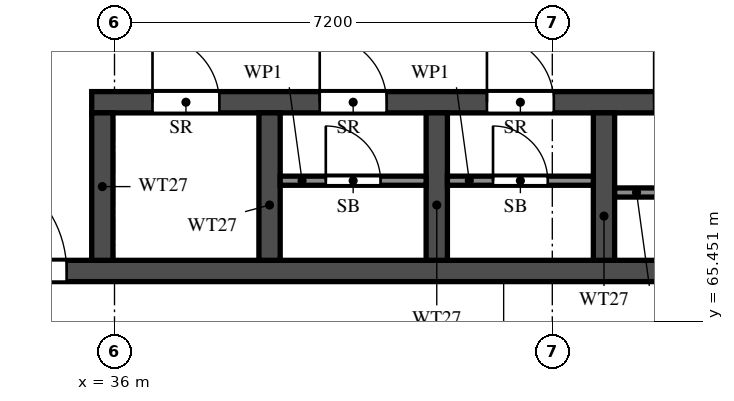
"""IFC4 building model, lengths in metres.
Left out: names, types, materials, properties, quantities, classifications, styles, units other than length and angle.
Written with IfcOpenShell. Run it as: python <this file> out.ifc"""

import sys

from ifc_helpers import new_model, si_unit, direction, frame, frame_2d, origin, place, context, subcontext, project, spatial, rectangle, extrude, element, fill, save


model = new_model("IFC4")
c1 = context("Model", 3, precision=1e-05, world=origin(), true_north=direction((0.0, 1.0)))
c2 = subcontext(c1, "Body", "Model", "MODEL_VIEW")
j1 = project(units=[si_unit("LENGTHUNIT", "METRE"), si_unit("PLANEANGLEUNIT", "RADIAN")], contexts=[c1])
p1 = place(None, origin())
s1 = spatial("IfcSite", under=j1, at=p1, CompositionType="ELEMENT")
p2 = place(p1, origin())
s2 = spatial("IfcBuilding", under=s1, at=p2, CompositionType="ELEMENT")
p3 = place(p2, frame((0.0, 0.0, 171.0)))
s3 = spatial("IfcBuildingStorey", under=s2, at=p3, CompositionType="ELEMENT", Elevation=171.0)
p4 = place(p3, frame((29.7, 66.275, 0.0), z_axis=(0.0, 0.0, 1.0), x_axis=(1.0, 0.0, 0.0)))
e1 = element("IfcWall", 1, at=p4, inside=s3, PredefinedType="SHEAR", context=c2, shape_type="SweptSolid", body=[
    extrude(rectangle(XDim=41.4, YDim=0.35, at=frame_2d((20.7, 0.0))), origin(), (0.0, 0.0, 1.0), 3.2),
])
p5 = place(p4, frame((0.925, 0.0, 0.0)))
e2 = element("IfcOpeningElement", 2, at=p5, cuts=e1, PredefinedType="OPENING", context=c2, shape_type="SweptSolid", body=[
    extrude(rectangle(XDim=1.1, YDim=2.1, at=frame_2d((0.55, 1.05))), frame((0.0, 0.185, 0.0), z_axis=(0.0, -1.0, 0.0), x_axis=(1.0, 0.0, 0.0)), (0.0, 0.0, 1.0), 0.37),
])
p6 = place(p4, frame((3.712, 0.0, 0.0)))
e3 = element("IfcOpeningElement", 3, at=p6, cuts=e1, PredefinedType="OPENING", context=c2, shape_type="SweptSolid", body=[
    extrude(rectangle(XDim=1.8, YDim=2.1, at=frame_2d((0.9, 1.05))), frame((0.0, 0.185, 0.0), z_axis=(0.0, -1.0, 0.0), x_axis=(1.0, 0.0, 0.0)), (0.0, 0.0, 1.0), 0.37),
])
p7 = place(p3, frame((35.625, 69.05, 0.0), z_axis=(0.0, 0.0, 1.0), x_axis=(1.0, 0.0, 0.0)))
e4 = element("IfcWall", 4, at=p7, inside=s3, PredefinedType="SHEAR", context=c2, shape_type="SweptSolid", body=[
    extrude(rectangle(XDim=24.1, YDim=0.35, at=frame_2d((12.05, 0.0))), origin(), (0.0, 0.0, 1.0), 3.2),
])
p8 = place(p7, frame((1.0, 0.0, 0.0)))
e5 = element("IfcOpeningElement", 5, at=p8, cuts=e4, PredefinedType="OPENING", context=c2, shape_type="SweptSolid", body=[
    extrude(rectangle(XDim=1.1, YDim=2.1, at=frame_2d((0.55, 1.05))), frame((0.0, 0.185, 0.0), z_axis=(0.0, -1.0, 0.0), x_axis=(1.0, 0.0, 0.0)), (0.0, 0.0, 1.0), 0.37),
])
p9 = place(p7, frame((3.75, 0.0, 0.0)))
e6 = element("IfcOpeningElement", 6, at=p9, cuts=e4, PredefinedType="OPENING", context=c2, shape_type="SweptSolid", body=[
    extrude(rectangle(XDim=1.1, YDim=2.1, at=frame_2d((0.55, 1.05))), frame((0.0, 0.185, 0.0), z_axis=(0.0, -1.0, 0.0), x_axis=(1.0, 0.0, 0.0)), (0.0, 0.0, 1.0), 0.37),
])
p10 = place(p7, frame((6.5, 0.0, 0.0)))
e7 = element("IfcOpeningElement", 7, at=p10, cuts=e4, PredefinedType="OPENING", context=c2, shape_type="SweptSolid", body=[
    extrude(rectangle(XDim=1.1, YDim=2.1, at=frame_2d((0.55, 1.05))), frame((0.0, 0.185, 0.0), z_axis=(0.0, -1.0, 0.0), x_axis=(1.0, 0.0, 0.0)), (0.0, 0.0, 1.0), 0.37),
])
p11 = place(p7, frame((9.25, 0.0, 0.0)))
e8 = element("IfcOpeningElement", 8, at=p11, cuts=e4, PredefinedType="OPENING", context=c2, shape_type="SweptSolid", body=[
    extrude(rectangle(XDim=1.1, YDim=2.1, at=frame_2d((0.55, 1.05))), frame((0.0, 0.185, 0.0), z_axis=(0.0, -1.0, 0.0), x_axis=(1.0, 0.0, 0.0)), (0.0, 0.0, 1.0), 0.37),
])
p12 = place(p7, frame((12.0, 0.0, 0.0)))
e9 = element("IfcOpeningElement", 9, at=p12, cuts=e4, PredefinedType="OPENING", context=c2, shape_type="SweptSolid", body=[
    extrude(rectangle(XDim=1.1, YDim=2.1, at=frame_2d((0.55, 1.05))), frame((0.0, 0.185, 0.0), z_axis=(0.0, -1.0, 0.0), x_axis=(1.0, 0.0, 0.0)), (0.0, 0.0, 1.0), 0.37),
])
p13 = place(p7, frame((14.75, 0.0, 0.0)))
e10 = element("IfcOpeningElement", 10, at=p13, cuts=e4, PredefinedType="OPENING", context=c2, shape_type="SweptSolid", body=[
    extrude(rectangle(XDim=1.1, YDim=2.1, at=frame_2d((0.55, 1.05))), frame((0.0, 0.185, 0.0), z_axis=(0.0, -1.0, 0.0), x_axis=(1.0, 0.0, 0.0)), (0.0, 0.0, 1.0), 0.37),
])
p14 = place(p7, frame((17.625, 0.0, 0.0)))
e11 = element("IfcOpeningElement", 11, at=p14, cuts=e4, PredefinedType="OPENING", context=c2, shape_type="SweptSolid", body=[
    extrude(rectangle(XDim=1.1, YDim=2.1, at=frame_2d((0.55, 1.05))), frame((0.0, 0.185, 0.0), z_axis=(0.0, -1.0, 0.0), x_axis=(1.0, 0.0, 0.0)), (0.0, 0.0, 1.0), 0.37),
])
p15 = place(p7, frame((20.625, 0.0, 0.0)))
e12 = element("IfcOpeningElement", 12, at=p15, cuts=e4, PredefinedType="OPENING", context=c2, shape_type="SweptSolid", body=[
    extrude(rectangle(XDim=1.1, YDim=2.1, at=frame_2d((0.55, 1.05))), frame((0.0, 0.185, 0.0), z_axis=(0.0, -1.0, 0.0), x_axis=(1.0, 0.0, 0.0)), (0.0, 0.0, 1.0), 0.37),
])
for number, where, z_axis, x_axis in (
    (13, (35.8, 66.45, 0.0), (0.0, 0.0, 1.0), (0.0, 1.0, 0.0)),
    (14, (38.55, 66.45, 0.0), (0.0, 0.0, 1.0), (0.0, 1.0, 0.0)),
    (15, (41.3, 66.45, 0.0), (0.0, 0.0, 1.0), (0.0, 1.0, 0.0)),
    (16, (44.05, 66.45, 0.0), (0.0, 0.0, 1.0), (0.0, 1.0, 0.0)),
):
    element("IfcWall", number, at=place(p3, frame(where, z_axis=z_axis, x_axis=x_axis)), inside=s3, PredefinedType="SHEAR", context=c2, shape_type="SweptSolid", body=[
        extrude(rectangle(XDim=2.425, YDim=0.35, at=frame_2d((1.212, 0.0))), origin(), (0.0, 0.0, 1.0), 3.2),
    ])
p16 = place(p3, frame((38.725, 67.76, 0.0), z_axis=(0.0, 0.0, 1.0), x_axis=(1.0, 0.0, 0.0)))
e17 = element("IfcWall", 17, at=p16, inside=s3, PredefinedType="PARTITIONING", context=c2, shape_type="SweptSolid", body=[
    extrude(rectangle(XDim=2.4, YDim=0.15, at=frame_2d((1.2, 0.0))), origin(), (0.0, 0.0, 1.0), 3.2),
])
p17 = place(p16, frame((0.75, 0.0, 0.0)))
e18 = element("IfcOpeningElement", 18, at=p17, cuts=e17, PredefinedType="OPENING", context=c2, shape_type="SweptSolid", body=[
    extrude(rectangle(XDim=0.9, YDim=2.1, at=frame_2d((0.45, 1.05))), frame((0.0, 0.085, 0.0), z_axis=(0.0, -1.0, 0.0), x_axis=(1.0, 0.0, 0.0)), (0.0, 0.0, 1.0), 0.17),
])
p18 = place(p3, frame((41.475, 67.76, 0.0), z_axis=(0.0, 0.0, 1.0), x_axis=(1.0, 0.0, 0.0)))
e19 = element("IfcWall", 19, at=p18, inside=s3, PredefinedType="PARTITIONING", context=c2, shape_type="SweptSolid", body=[
    extrude(rectangle(XDim=2.4, YDim=0.15, at=frame_2d((1.2, 0.0))), origin(), (0.0, 0.0, 1.0), 3.2),
])
p19 = place(p18, frame((0.75, 0.0, 0.0)))
e20 = element("IfcOpeningElement", 20, at=p19, cuts=e19, PredefinedType="OPENING", context=c2, shape_type="SweptSolid", body=[
    extrude(rectangle(XDim=0.9, YDim=2.1, at=frame_2d((0.45, 1.05))), frame((0.0, 0.085, 0.0), z_axis=(0.0, -1.0, 0.0), x_axis=(1.0, 0.0, 0.0)), (0.0, 0.0, 1.0), 0.17),
])
p20 = place(p3, frame((44.225, 67.565, 0.0), z_axis=(0.0, 0.0, 1.0), x_axis=(1.0, 0.0, 0.0)))
e21 = element("IfcWall", 21, at=p20, inside=s3, PredefinedType="PARTITIONING", context=c2, shape_type="SweptSolid", body=[
    extrude(rectangle(XDim=2.4, YDim=0.15, at=frame_2d((1.2, 0.0))), origin(), (0.0, 0.0, 1.0), 3.2),
])
p21 = place(p20, frame((0.75, 0.0, 0.0)))
e22 = element("IfcOpeningElement", 22, at=p21, cuts=e21, PredefinedType="OPENING", context=c2, shape_type="SweptSolid", body=[
    extrude(rectangle(XDim=0.9, YDim=2.1, at=frame_2d((0.45, 1.05))), frame((0.0, 0.085, 0.0), z_axis=(0.0, -1.0, 0.0), x_axis=(1.0, 0.0, 0.0)), (0.0, 0.0, 1.0), 0.17),
])
p22 = place(p6, origin())
e23 = element("IfcDoor", 23, at=p22, inside=s3, OperationType="DOUBLE_DOOR_SINGLE_SWING", PredefinedType="DOOR", context=c2, shape_type="SweptSolid", body=[
    extrude(rectangle(XDim=1.8, YDim=2.1, at=frame_2d((0.9, 1.05))), frame((0.0, 0.025, 0.0), z_axis=(0.0, -1.0, 0.0), x_axis=(1.0, 0.0, 0.0)), (0.0, 0.0, 1.0), 0.05),
])
fill(e3, e23)
p23 = place(p8, origin())
e24 = element("IfcDoor", 24, at=p23, inside=s3, OperationType="SINGLE_SWING_RIGHT", PredefinedType="DOOR", context=c2, shape_type="SweptSolid", body=[
    extrude(rectangle(XDim=1.1, YDim=2.1, at=frame_2d((0.55, 1.05))), frame((0.0, 0.025, 0.0), z_axis=(0.0, -1.0, 0.0), x_axis=(1.0, 0.0, 0.0)), (0.0, 0.0, 1.0), 0.05),
])
fill(e5, e24)
p24 = place(p9, origin())
e25 = element("IfcDoor", 25, at=p24, inside=s3, OperationType="SINGLE_SWING_LEFT", PredefinedType="DOOR", context=c2, shape_type="SweptSolid", body=[
    extrude(rectangle(XDim=1.1, YDim=2.1, at=frame_2d((0.55, 1.05))), frame((0.0, 0.025, 0.0), z_axis=(0.0, -1.0, 0.0), x_axis=(1.0, 0.0, 0.0)), (0.0, 0.0, 1.0), 0.05),
])
fill(e6, e25)
p25 = place(p17, origin())
e26 = element("IfcDoor", 26, at=p25, inside=s3, OperationType="SINGLE_SWING_RIGHT", PredefinedType="DOOR", context=c2, shape_type="SweptSolid", body=[
    extrude(rectangle(XDim=0.9, YDim=2.1, at=frame_2d((0.45, 1.05))), frame((0.0, 0.025, 0.0), z_axis=(0.0, -1.0, 0.0), x_axis=(1.0, 0.0, 0.0)), (0.0, 0.0, 1.0), 0.05),
])
fill(e18, e26)
p26 = place(p10, origin())
e27 = element("IfcDoor", 27, at=p26, inside=s3, OperationType="SINGLE_SWING_RIGHT", PredefinedType="DOOR", context=c2, shape_type="SweptSolid", body=[
    extrude(rectangle(XDim=1.1, YDim=2.1, at=frame_2d((0.55, 1.05))), frame((0.0, 0.025, 0.0), z_axis=(0.0, -1.0, 0.0), x_axis=(1.0, 0.0, 0.0)), (0.0, 0.0, 1.0), 0.05),
])
fill(e7, e27)
p27 = place(p19, origin())
e28 = element("IfcDoor", 28, at=p27, inside=s3, OperationType="SINGLE_SWING_LEFT", PredefinedType="DOOR", context=c2, shape_type="SweptSolid", body=[
    extrude(rectangle(XDim=0.9, YDim=2.1, at=frame_2d((0.45, 1.05))), frame((0.0, 0.025, 0.0), z_axis=(0.0, -1.0, 0.0), x_axis=(1.0, 0.0, 0.0)), (0.0, 0.0, 1.0), 0.05),
])
fill(e20, e28)
save(model, sys.argv[1])
